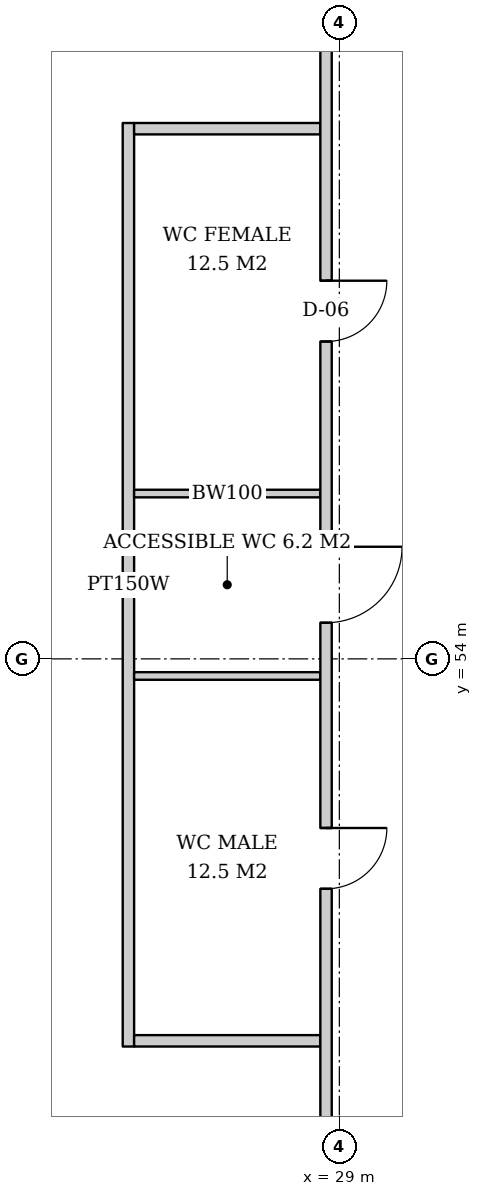
"""IFC4 building model, lengths in metres.
Left out: names, types, materials, properties, quantities, classifications, styles, units other than length and angle.
Written with IfcOpenShell. Run it as: python <this file> out.ifc"""

import sys

from ifc_helpers import new_model, si_unit, direction, frame, frame_2d, origin, place, context, subcontext, project, spatial, rectangle, extrude, element, fill, save


model = new_model("IFC4")
c1 = context("Model", 3, precision=1e-05, world=origin(), true_north=direction((0.0, 1.0)))
c2 = subcontext(c1, "Body", "Model", "MODEL_VIEW")
j1 = project(units=[si_unit("LENGTHUNIT", "METRE"), si_unit("PLANEANGLEUNIT", "RADIAN")], contexts=[c1])
p1 = place(None, origin())
s1 = spatial("IfcSite", under=j1, at=p1, CompositionType="ELEMENT")
p2 = place(p1, origin())
s2 = spatial("IfcBuilding", under=s1, at=p2, CompositionType="ELEMENT")
p3 = place(p2, frame((0.0, 0.0, 66.6)))
s3 = spatial("IfcBuildingStorey", under=s2, at=p3, CompositionType="ELEMENT", Elevation=66.6)
p4 = place(p3, frame((26.225, 61.05, 0.0), z_axis=(0.0, 0.0, 1.0), x_axis=(0.0, -1.0, 0.0)))
e1 = element("IfcWall", 1, at=p4, inside=s3, PredefinedType="PARTITIONING", context=c2, shape_type="SweptSolid", body=[
    extrude(rectangle(XDim=12.15, YDim=0.15, at=frame_2d((6.075, 0.0))), origin(), (0.0, 0.0, 1.0), 2.612),
])
p5 = place(p3, frame((28.75, 60.975, 0.0), z_axis=(0.0, 0.0, 1.0), x_axis=(-1.0, 0.0, 0.0)))
e2 = element("IfcWall", 2, at=p5, inside=s3, PredefinedType="PARTITIONING", context=c2, shape_type="SweptSolid", body=[
    extrude(rectangle(XDim=2.45, YDim=0.15, at=frame_2d((1.225, 0.0))), origin(), (0.0, 0.0, 1.0), 3.62),
])
for number, where, z_axis, x_axis in (
    (3, (28.75, 56.175, 0.0), (0.0, 0.0, 1.0), (-1.0, 0.0, 0.0)),
    (4, (28.75, 53.775, 0.0), (0.0, 0.0, 1.0), (-1.0, 0.0, 0.0)),
):
    element("IfcWall", number, at=place(p3, frame(where, z_axis=z_axis, x_axis=x_axis)), inside=s3, PredefinedType="SOLIDWALL", context=c2, shape_type="SweptSolid", body=[
        extrude(rectangle(XDim=2.45, YDim=0.1, at=frame_2d((1.225, 0.0))), origin(), (0.0, 0.0, 1.0), 3.62),
    ])
p6 = place(p3, frame((28.75, 48.975, 0.0), z_axis=(0.0, 0.0, 1.0), x_axis=(-1.0, 0.0, 0.0)))
e5 = element("IfcWall", 5, at=p6, inside=s3, PredefinedType="PARTITIONING", context=c2, shape_type="SweptSolid", body=[
    extrude(rectangle(XDim=2.45, YDim=0.15, at=frame_2d((1.225, 0.0))), origin(), (0.0, 0.0, 1.0), 3.62),
])
p7 = place(p3, frame((28.825, 62.25, 0.0), z_axis=(0.0, 0.0, 1.0), x_axis=(0.0, -1.0, 0.0)))
e6 = element("IfcWall", 6, at=p7, inside=s3, PredefinedType="PARTITIONING", context=c2, shape_type="SweptSolid", body=[
    extrude(rectangle(XDim=32.35, YDim=0.15, at=frame_2d((16.175, 0.0))), origin(), (0.0, 0.0, 1.0), 2.612),
])
p8 = place(p7, frame((3.275, 0.0, 0.0)))
e7 = element("IfcOpeningElement", 7, at=p8, cuts=e6, PredefinedType="OPENING", context=c2, shape_type="SweptSolid", body=[
    extrude(rectangle(XDim=0.8, YDim=2.1, at=frame_2d((0.4, 1.05))), frame((0.0, 0.085, 0.0), z_axis=(0.0, -1.0, 0.0), x_axis=(1.0, 0.0, 0.0)), (0.0, 0.0, 1.0), 0.17),
])
p9 = place(p7, frame((6.775, 0.0, 0.0)))
e8 = element("IfcOpeningElement", 8, at=p9, cuts=e6, PredefinedType="OPENING", context=c2, shape_type="SweptSolid", body=[
    extrude(rectangle(XDim=1.0, YDim=2.1, at=frame_2d((0.5, 1.05))), frame((0.0, 0.085, 0.0), z_axis=(0.0, -1.0, 0.0), x_axis=(1.0, 0.0, 0.0)), (0.0, 0.0, 1.0), 0.17),
])
p10 = place(p7, frame((10.475, 0.0, 0.0)))
e9 = element("IfcOpeningElement", 9, at=p10, cuts=e6, PredefinedType="OPENING", context=c2, shape_type="SweptSolid", body=[
    extrude(rectangle(XDim=0.8, YDim=2.1, at=frame_2d((0.4, 1.05))), frame((0.0, 0.085, 0.0), z_axis=(0.0, -1.0, 0.0), x_axis=(1.0, 0.0, 0.0)), (0.0, 0.0, 1.0), 0.17),
])
p11 = place(p8, origin())
e10 = element("IfcDoor", 10, at=p11, inside=s3, OperationType="SINGLE_SWING_LEFT", PredefinedType="DOOR", context=c2, shape_type="SweptSolid", body=[
    extrude(rectangle(XDim=0.8, YDim=2.1, at=frame_2d((0.4, 1.05))), frame((0.0, 0.025, 0.0), z_axis=(0.0, -1.0, 0.0), x_axis=(1.0, 0.0, 0.0)), (0.0, 0.0, 1.0), 0.05),
])
fill(e7, e10)
p12 = place(p9, origin())
e11 = element("IfcDoor", 11, at=p12, inside=s3, OperationType="SINGLE_SWING_LEFT", PredefinedType="DOOR", context=c2, shape_type="SweptSolid", body=[
    extrude(rectangle(XDim=1.0, YDim=2.1, at=frame_2d((0.5, 1.05))), frame((0.0, 0.025, 0.0), z_axis=(0.0, -1.0, 0.0), x_axis=(1.0, 0.0, 0.0)), (0.0, 0.0, 1.0), 0.05),
])
fill(e8, e11)
p13 = place(p10, origin())
e12 = element("IfcDoor", 12, at=p13, inside=s3, OperationType="SINGLE_SWING_LEFT", PredefinedType="DOOR", context=c2, shape_type="SweptSolid", body=[
    extrude(rectangle(XDim=0.8, YDim=2.1, at=frame_2d((0.4, 1.05))), frame((0.0, 0.025, 0.0), z_axis=(0.0, -1.0, 0.0), x_axis=(1.0, 0.0, 0.0)), (0.0, 0.0, 1.0), 0.05),
])
fill(e9, e12)
save(model, sys.argv[1])
